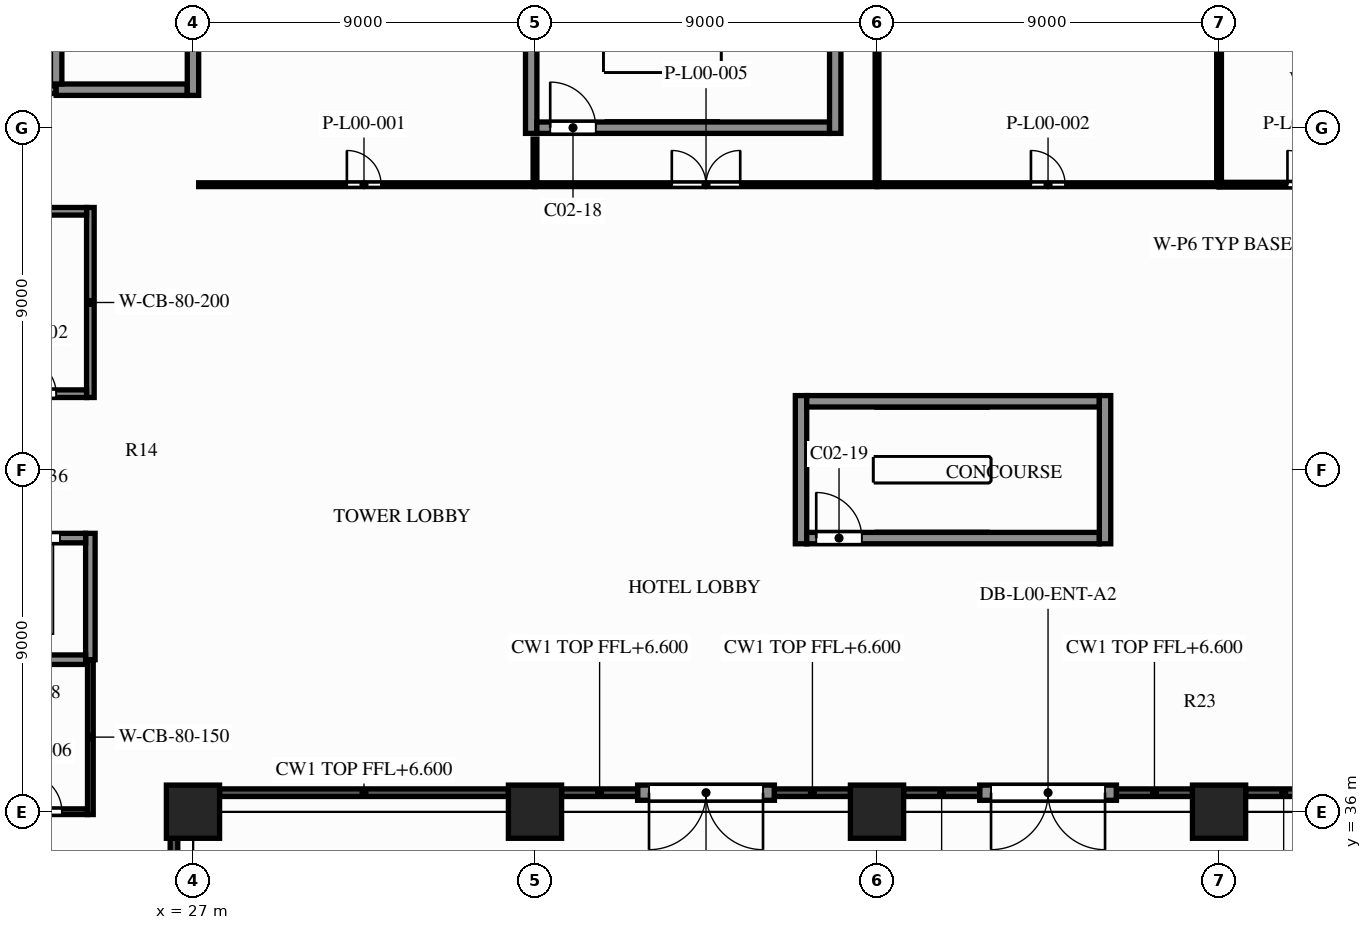
"""IFC4 building model, lengths in metres.
Left out: names, types, materials, properties, quantities, classifications, styles, units other than length and angle.
Written with IfcOpenShell. Run it as: python <this file> out.ifc"""

import sys

from ifc_helpers import new_model, si_unit, direction, frame, frame_2d, origin, origin_2d, place, context, subcontext, project, spatial, rectangle, extrude, element, fill, save


model = new_model("IFC4")
c1 = context("Model", 3, precision=1e-05, world=origin(), true_north=direction((0.0, 1.0)))
c2 = subcontext(c1, "Body", "Model", "MODEL_VIEW")
j1 = project(units=[si_unit("LENGTHUNIT", "METRE"), si_unit("PLANEANGLEUNIT", "RADIAN")], contexts=[c1])
p1 = place(None, origin())
s1 = spatial("IfcSite", under=j1, at=p1, CompositionType="ELEMENT")
p2 = place(p1, origin())
s2 = spatial("IfcBuilding", under=s1, at=p2, CompositionType="ELEMENT")
p3 = place(p2, origin())
s3 = spatial("IfcBuildingStorey", under=s2, at=p3, CompositionType="ELEMENT", Elevation=0.0)
for number, where, z_axis, x_axis in (
    (1, (27.0, 36.0, 0.0), (0.0, 0.0, 1.0), (1.0, 0.0, 0.0)),
    (2, (36.0, 36.0, 0.0), (0.0, 0.0, 1.0), (1.0, 0.0, 0.0)),
    (3, (45.0, 36.0, 0.0), (0.0, 0.0, 1.0), (1.0, 0.0, 0.0)),
    (4, (54.0, 36.0, 0.0), (0.0, 0.0, 1.0), (1.0, 0.0, 0.0)),
):
    element("IfcColumn", number, at=place(p3, frame(where, z_axis=z_axis, x_axis=x_axis)), inside=s3, PredefinedType="COLUMN", context=c2, shape_type="SweptSolid", body=[
        extrude(rectangle(XDim=1.4, YDim=1.4, at=origin_2d()), origin(), (0.0, 0.0, 1.0), 7.5),
    ])
p4 = place(p3, frame((42.3, 36.5, 0.0), z_axis=(0.0, 0.0, 1.0), x_axis=(-1.0, 0.0, 0.0)))
e5 = element("IfcWall", 5, at=p4, inside=s3, PredefinedType="SOLIDWALL", context=c2, shape_type="SweptSolid", body=[
    extrude(rectangle(XDim=3.6, YDim=0.4, at=frame_2d((1.8, 0.0))), origin(), (0.0, 0.0, 1.0), 6.6),
])
p5 = place(p4, frame((0.3, 0.0, 0.0)))
e6 = element("IfcOpeningElement", 6, at=p5, cuts=e5, PredefinedType="OPENING", context=c2, shape_type="SweptSolid", body=[
    extrude(rectangle(XDim=3.0, YDim=3.0, at=frame_2d((1.5, 1.5))), frame((0.0, 0.21, 0.0), z_axis=(0.0, -1.0, 0.0), x_axis=(1.0, 0.0, 0.0)), (0.0, 0.0, 1.0), 0.42),
])
p6 = place(p3, frame((51.3, 36.5, 0.0), z_axis=(0.0, 0.0, 1.0), x_axis=(-1.0, 0.0, 0.0)))
e7 = element("IfcWall", 7, at=p6, inside=s3, PredefinedType="SOLIDWALL", context=c2, shape_type="SweptSolid", body=[
    extrude(rectangle(XDim=3.6, YDim=0.4, at=frame_2d((1.8, 0.0))), origin(), (0.0, 0.0, 1.0), 6.6),
])
p7 = place(p6, frame((0.3, 0.0, 0.0)))
e8 = element("IfcOpeningElement", 8, at=p7, cuts=e7, PredefinedType="OPENING", context=c2, shape_type="SweptSolid", body=[
    extrude(rectangle(XDim=3.0, YDim=3.0, at=frame_2d((1.5, 1.5))), frame((0.0, 0.21, 0.0), z_axis=(0.0, -1.0, 0.0), x_axis=(1.0, 0.0, 0.0)), (0.0, 0.0, 1.0), 0.42),
])
p8 = place(p3, frame((12.4, 36.0, 0.0), z_axis=(0.0, 0.0, 1.0), x_axis=(1.0, 0.0, 0.0)))
e9 = element("IfcWall", 9, at=p8, inside=s3, PredefinedType="SHEAR", context=c2, shape_type="SweptSolid", body=[
    extrude(rectangle(XDim=11.825, YDim=0.15, at=frame_2d((5.913, 0.0))), origin(), (0.0, 0.0, 1.0), 7.2),
])
p9 = place(p8, frame((0.725, 0.0, 0.0)))
e10 = element("IfcOpeningElement", 10, at=p9, cuts=e9, PredefinedType="OPENING", context=c2, shape_type="SweptSolid", body=[
    extrude(rectangle(XDim=0.95, YDim=2.1, at=frame_2d((0.475, 1.05))), frame((0.0, 0.085, 0.0), z_axis=(0.0, -1.0, 0.0), x_axis=(1.0, 0.0, 0.0)), (0.0, 0.0, 1.0), 0.17),
])
p10 = place(p8, frame((3.7, 0.0, 0.0)))
e11 = element("IfcOpeningElement", 11, at=p10, cuts=e9, PredefinedType="OPENING", context=c2, shape_type="SweptSolid", body=[
    extrude(rectangle(XDim=0.9, YDim=2.1, at=frame_2d((0.45, 1.05))), frame((0.0, 0.085, 0.0), z_axis=(0.0, -1.0, 0.0), x_axis=(1.0, 0.0, 0.0)), (0.0, 0.0, 1.0), 0.17),
])
p11 = place(p8, frame((7.2, 0.0, 0.0)))
e12 = element("IfcOpeningElement", 12, at=p11, cuts=e9, PredefinedType="OPENING", context=c2, shape_type="SweptSolid", body=[
    extrude(rectangle(XDim=0.9, YDim=2.1, at=frame_2d((0.45, 1.05))), frame((0.0, 0.085, 0.0), z_axis=(0.0, -1.0, 0.0), x_axis=(1.0, 0.0, 0.0)), (0.0, 0.0, 1.0), 0.17),
])
p12 = place(p8, frame((10.15, 0.0, 0.0)))
e13 = element("IfcOpeningElement", 13, at=p12, cuts=e9, PredefinedType="OPENING", context=c2, shape_type="SweptSolid", body=[
    extrude(rectangle(XDim=1.0, YDim=2.1, at=frame_2d((0.5, 1.05))), frame((0.0, 0.085, 0.0), z_axis=(0.0, -1.0, 0.0), x_axis=(1.0, 0.0, 0.0)), (0.0, 0.0, 1.0), 0.17),
])
p13 = place(p3, frame((8.1, 40.0, 0.0), z_axis=(0.0, 0.0, 1.0), x_axis=(1.0, 0.0, 0.0)))
e14 = element("IfcWall", 14, at=p13, inside=s3, PredefinedType="SHEAR", context=c2, shape_type="SweptSolid", body=[
    extrude(rectangle(XDim=16.075, YDim=0.25, at=frame_2d((8.038, 0.0))), origin(), (0.0, 0.0, 1.0), 7.2),
])
p14 = place(p3, frame((8.1, 43.2, 0.0), z_axis=(0.0, 0.0, 1.0), x_axis=(1.0, 0.0, 0.0)))
e15 = element("IfcWall", 15, at=p14, inside=s3, PredefinedType="SHEAR", context=c2, shape_type="SweptSolid", body=[
    extrude(rectangle(XDim=16.075, YDim=0.25, at=frame_2d((8.038, 0.0))), origin(), (0.0, 0.0, 1.0), 7.2),
])
p15 = place(p14, frame((14.3, 0.0, 0.0)))
e16 = element("IfcOpeningElement", 16, at=p15, cuts=e15, PredefinedType="OPENING", context=c2, shape_type="SweptSolid", body=[
    extrude(rectangle(XDim=1.1, YDim=2.1, at=frame_2d((0.55, 1.05))), frame((0.0, 0.135, 0.0), z_axis=(0.0, -1.0, 0.0), x_axis=(1.0, 0.0, 0.0)), (0.0, 0.0, 1.0), 0.27),
])
p16 = place(p14, frame((0.8, 0.0, 0.0)))
e17 = element("IfcOpeningElement", 17, at=p16, cuts=e15, PredefinedType="OPENING", context=c2, shape_type="SweptSolid", body=[
    extrude(rectangle(XDim=1.1, YDim=2.1, at=frame_2d((0.55, 1.05))), frame((0.0, 0.135, 0.0), z_axis=(0.0, -1.0, 0.0), x_axis=(1.0, 0.0, 0.0)), (0.0, 0.0, 1.0), 0.27),
])
p17 = place(p14, frame((3.5, 0.0, 0.0)))
e18 = element("IfcOpeningElement", 18, at=p17, cuts=e15, PredefinedType="OPENING", context=c2, shape_type="SweptSolid", body=[
    extrude(rectangle(XDim=1.1, YDim=2.1, at=frame_2d((0.55, 1.05))), frame((0.0, 0.135, 0.0), z_axis=(0.0, -1.0, 0.0), x_axis=(1.0, 0.0, 0.0)), (0.0, 0.0, 1.0), 0.27),
])
p18 = place(p14, frame((6.2, 0.0, 0.0)))
e19 = element("IfcOpeningElement", 19, at=p18, cuts=e15, PredefinedType="OPENING", context=c2, shape_type="SweptSolid", body=[
    extrude(rectangle(XDim=1.1, YDim=2.1, at=frame_2d((0.55, 1.05))), frame((0.0, 0.135, 0.0), z_axis=(0.0, -1.0, 0.0), x_axis=(1.0, 0.0, 0.0)), (0.0, 0.0, 1.0), 0.27),
])
p19 = place(p14, frame((8.9, 0.0, 0.0)))
e20 = element("IfcOpeningElement", 20, at=p19, cuts=e15, PredefinedType="OPENING", context=c2, shape_type="SweptSolid", body=[
    extrude(rectangle(XDim=1.1, YDim=2.1, at=frame_2d((0.55, 1.05))), frame((0.0, 0.135, 0.0), z_axis=(0.0, -1.0, 0.0), x_axis=(1.0, 0.0, 0.0)), (0.0, 0.0, 1.0), 0.27),
])
p20 = place(p14, frame((11.6, 0.0, 0.0)))
e21 = element("IfcOpeningElement", 21, at=p20, cuts=e15, PredefinedType="OPENING", context=c2, shape_type="SweptSolid", body=[
    extrude(rectangle(XDim=1.1, YDim=2.1, at=frame_2d((0.55, 1.05))), frame((0.0, 0.135, 0.0), z_axis=(0.0, -1.0, 0.0), x_axis=(1.0, 0.0, 0.0)), (0.0, 0.0, 1.0), 0.27),
])
p21 = place(p3, frame((43.15, 43.2, 0.0), z_axis=(0.0, 0.0, 1.0), x_axis=(1.0, 0.0, 0.0)))
e22 = element("IfcWall", 22, at=p21, inside=s3, PredefinedType="SHEAR", context=c2, shape_type="SweptSolid", body=[
    extrude(rectangle(XDim=7.7, YDim=0.3, at=frame_2d((3.85, 0.0))), origin(), (0.0, 0.0, 1.0), 7.2),
])
p22 = place(p21, frame((0.25, 0.0, 0.0)))
e23 = element("IfcOpeningElement", 23, at=p22, cuts=e22, PredefinedType="OPENING", context=c2, shape_type="SweptSolid", body=[
    extrude(rectangle(XDim=1.2, YDim=2.2, at=frame_2d((0.6, 1.1))), frame((0.0, 0.16, 0.0), z_axis=(0.0, -1.0, 0.0), x_axis=(1.0, 0.0, 0.0)), (0.0, 0.0, 1.0), 0.32),
])
p23 = place(p3, frame((43.15, 46.8, 0.0), z_axis=(0.0, 0.0, 1.0), x_axis=(1.0, 0.0, 0.0)))
e24 = element("IfcWall", 24, at=p23, inside=s3, PredefinedType="SHEAR", context=c2, shape_type="SweptSolid", body=[
    extrude(rectangle(XDim=7.7, YDim=0.3, at=frame_2d((3.85, 0.0))), origin(), (0.0, 0.0, 1.0), 7.2),
])
p24 = place(p3, frame((21.6, 47.0, 0.0), z_axis=(0.0, 0.0, 1.0), x_axis=(1.0, 0.0, 0.0)))
e25 = element("IfcWall", 25, at=p24, inside=s3, PredefinedType="PARTITIONING", context=c2, shape_type="SweptSolid", body=[
    extrude(rectangle(XDim=2.6, YDim=0.2, at=frame_2d((1.3, 0.0))), origin(), (0.0, 0.0, 1.0), 7.2),
])
p25 = place(p24, frame((0.9, 0.0, 0.0)))
e26 = element("IfcOpeningElement", 26, at=p25, cuts=e25, PredefinedType="OPENING", context=c2, shape_type="SweptSolid", body=[
    extrude(rectangle(XDim=0.9, YDim=2.1, at=frame_2d((0.45, 1.05))), frame((0.0, 0.11, 0.0), z_axis=(0.0, -1.0, 0.0), x_axis=(1.0, 0.0, 0.0)), (0.0, 0.0, 1.0), 0.22),
])
p26 = place(p3, frame((21.6, 51.8, 0.0), z_axis=(0.0, 0.0, 1.0), x_axis=(1.0, 0.0, 0.0)))
e27 = element("IfcWall", 27, at=p26, inside=s3, PredefinedType="PARTITIONING", context=c2, shape_type="SweptSolid", body=[
    extrude(rectangle(XDim=2.6, YDim=0.2, at=frame_2d((1.3, 0.0))), origin(), (0.0, 0.0, 1.0), 7.2),
])
p27 = place(p3, frame((36.05, 54.0, 0.0), z_axis=(0.0, 0.0, 1.0), x_axis=(1.0, 0.0, 0.0)))
e28 = element("IfcWall", 28, at=p27, inside=s3, PredefinedType="SHEAR", context=c2, shape_type="SweptSolid", body=[
    extrude(rectangle(XDim=7.7, YDim=0.3, at=frame_2d((3.85, 0.0))), origin(), (0.0, 0.0, 1.0), 7.2),
])
p28 = place(p27, frame((0.35, 0.0, 0.0)))
e29 = element("IfcOpeningElement", 29, at=p28, cuts=e28, PredefinedType="OPENING", context=c2, shape_type="SweptSolid", body=[
    extrude(rectangle(XDim=1.2, YDim=2.2, at=frame_2d((0.6, 1.1))), frame((0.0, 0.16, 0.0), z_axis=(0.0, -1.0, 0.0), x_axis=(1.0, 0.0, 0.0)), (0.0, 0.0, 1.0), 0.32),
])
p29 = place(p3, frame((16.85, 55.0, 0.0), z_axis=(0.0, 0.0, 1.0), x_axis=(1.0, 0.0, 0.0)))
e30 = element("IfcWall", 30, at=p29, inside=s3, PredefinedType="PARTITIONING", context=c2, shape_type="SweptSolid", body=[
    extrude(rectangle(XDim=6.55, YDim=0.2, at=frame_2d((3.275, 0.0))), origin(), (0.0, 0.0, 1.0), 7.2),
])
p30 = place(p29, frame((2.775, 0.0, 0.0)))
e31 = element("IfcOpeningElement", 31, at=p30, cuts=e30, PredefinedType="OPENING", context=c2, shape_type="SweptSolid", body=[
    extrude(rectangle(XDim=1.0, YDim=2.1, at=frame_2d((0.5, 1.05))), frame((0.0, 0.11, 0.0), z_axis=(0.0, -1.0, 0.0), x_axis=(1.0, 0.0, 0.0)), (0.0, 0.0, 1.0), 0.22),
])
p31 = place(p3, frame((23.4, 55.0, 0.0), z_axis=(0.0, 0.0, 1.0), x_axis=(1.0, 0.0, 0.0)))
e32 = element("IfcWall", 32, at=p31, inside=s3, PredefinedType="SHEAR", context=c2, shape_type="SweptSolid", body=[
    extrude(rectangle(XDim=3.45, YDim=0.3, at=frame_2d((1.725, 0.0))), origin(), (0.0, 0.0, 1.0), 7.2),
])
p32 = place(p3, frame((23.4, 55.15, 0.0), z_axis=(0.0, 0.0, 1.0), x_axis=(0.0, 1.0, 0.0)))
e33 = element("IfcWall", 33, at=p32, inside=s3, PredefinedType="SHEAR", context=c2, shape_type="SweptSolid", body=[
    extrude(rectangle(XDim=8.0, YDim=0.3, at=frame_2d((4.0, 0.0))), origin(), (0.0, 0.0, 1.0), 7.2),
])
p33 = place(p3, frame((24.3, 35.925, 0.0), z_axis=(0.0, 0.0, 1.0), x_axis=(0.0, 1.0, 0.0)))
e34 = element("IfcWall", 34, at=p33, inside=s3, PredefinedType="SHEAR", context=c2, shape_type="SweptSolid", body=[
    extrude(rectangle(XDim=4.075, YDim=0.15, at=frame_2d((2.038, 0.0))), origin(), (0.0, 0.0, 1.0), 7.2),
])
p34 = place(p3, frame((24.3, 46.9, 0.0), z_axis=(0.0, 0.0, 1.0), x_axis=(0.0, 1.0, 0.0)))
e35 = element("IfcWall", 35, at=p34, inside=s3, PredefinedType="SHEAR", context=c2, shape_type="SweptSolid", body=[
    extrude(rectangle(XDim=5.0, YDim=0.2, at=frame_2d((2.5, 0.0))), origin(), (0.0, 0.0, 1.0), 7.2),
])
p35 = place(p3, frame((24.3, 40.0, 0.0), z_axis=(0.0, 0.0, 1.0), x_axis=(0.0, 1.0, 0.0)))
e36 = element("IfcWall", 36, at=p35, inside=s3, PredefinedType="SHEAR", context=c2, shape_type="SweptSolid", body=[
    extrude(rectangle(XDim=3.325, YDim=0.25, at=frame_2d((1.663, 0.0))), origin(), (0.0, 0.0, 1.0), 7.2),
])
p36 = place(p3, frame((27.0, 54.85, 0.0), z_axis=(0.0, 0.0, 1.0), x_axis=(0.0, 1.0, 0.0)))
e37 = element("IfcWall", 37, at=p36, inside=s3, PredefinedType="SHEAR", context=c2, shape_type="SweptSolid", body=[
    extrude(rectangle(XDim=8.35, YDim=0.3, at=frame_2d((4.175, 0.0))), origin(), (0.0, 0.0, 1.0), 7.2),
])
p37 = place(p36, frame((6.55, 0.0, 0.0)))
e38 = element("IfcOpeningElement", 38, at=p37, cuts=e37, PredefinedType="OPENING", context=c2, shape_type="SweptSolid", body=[
    extrude(rectangle(XDim=1.2, YDim=2.2, at=frame_2d((0.6, 1.1))), frame((0.0, 0.16, 0.0), z_axis=(0.0, -1.0, 0.0), x_axis=(1.0, 0.0, 0.0)), (0.0, 0.0, 1.0), 0.32),
])
for number, where, z_axis, x_axis in (
    (39, (35.9, 53.85, 0.0), (0.0, 0.0, 1.0), (0.0, 1.0, 0.0)),
    (40, (43.0, 43.05, 0.0), (0.0, 0.0, 1.0), (0.0, 1.0, 0.0)),
    (41, (43.9, 53.85, 0.0), (0.0, 0.0, 1.0), (0.0, 1.0, 0.0)),
    (42, (51.0, 43.05, 0.0), (0.0, 0.0, 1.0), (0.0, 1.0, 0.0)),
):
    element("IfcWall", number, at=place(p3, frame(where, z_axis=z_axis, x_axis=x_axis)), inside=s3, PredefinedType="SHEAR", context=c2, shape_type="SweptSolid", body=[
        extrude(rectangle(XDim=3.9, YDim=0.3, at=frame_2d((1.95, 0.0))), origin(), (0.0, 0.0, 1.0), 7.2),
    ])
p38 = place(p3, frame((27.15, 52.5, 0.0), z_axis=(0.0, 0.0, 1.0), x_axis=(1.0, 0.0, 0.0)))
e43 = element("IfcWall", 43, at=p38, inside=s3, PredefinedType="PARTITIONING", context=c2, shape_type="SweptSolid", body=[
    extrude(rectangle(XDim=8.85, YDim=0.1, at=frame_2d((4.425, 0.0))), origin(), (0.0, 0.0, 1.0), 6.48),
])
p39 = place(p38, frame((3.9, 0.0, 0.0)))
e44 = element("IfcOpeningElement", 44, at=p39, cuts=e43, PredefinedType="OPENING", context=c2, shape_type="SweptSolid", body=[
    extrude(rectangle(XDim=0.9, YDim=2.1, at=frame_2d((0.45, 1.05))), frame((0.0, 0.06, 0.0), z_axis=(0.0, -1.0, 0.0), x_axis=(1.0, 0.0, 0.0)), (0.0, 0.0, 1.0), 0.12),
])
p40 = place(p3, frame((36.0, 52.5, 0.0), z_axis=(0.0, 0.0, 1.0), x_axis=(1.0, 0.0, 0.0)))
e45 = element("IfcWall", 45, at=p40, inside=s3, PredefinedType="PARTITIONING", context=c2, shape_type="SweptSolid", body=[
    extrude(rectangle(XDim=9.0, YDim=0.1, at=frame_2d((4.5, 0.0))), origin(), (0.0, 0.0, 1.0), 6.48),
])
p41 = place(p40, frame((3.6, 0.0, 0.0)))
e46 = element("IfcOpeningElement", 46, at=p41, cuts=e45, PredefinedType="OPENING", context=c2, shape_type="SweptSolid", body=[
    extrude(rectangle(XDim=1.8, YDim=2.1, at=frame_2d((0.9, 1.05))), frame((0.0, 0.06, 0.0), z_axis=(0.0, -1.0, 0.0), x_axis=(1.0, 0.0, 0.0)), (0.0, 0.0, 1.0), 0.12),
])
p42 = place(p3, frame((45.0, 52.5, 0.0), z_axis=(0.0, 0.0, 1.0), x_axis=(1.0, 0.0, 0.0)))
e47 = element("IfcWall", 47, at=p42, inside=s3, PredefinedType="PARTITIONING", context=c2, shape_type="SweptSolid", body=[
    extrude(rectangle(XDim=9.0, YDim=0.1, at=frame_2d((4.5, 0.0))), origin(), (0.0, 0.0, 1.0), 6.48),
])
p43 = place(p42, frame((4.05, 0.0, 0.0)))
e48 = element("IfcOpeningElement", 48, at=p43, cuts=e47, PredefinedType="OPENING", context=c2, shape_type="SweptSolid", body=[
    extrude(rectangle(XDim=0.9, YDim=2.1, at=frame_2d((0.45, 1.05))), frame((0.0, 0.06, 0.0), z_axis=(0.0, -1.0, 0.0), x_axis=(1.0, 0.0, 0.0)), (0.0, 0.0, 1.0), 0.12),
])
p44 = place(p3, frame((54.0, 52.5, 0.0), z_axis=(0.0, 0.0, 1.0), x_axis=(1.0, 0.0, 0.0)))
e49 = element("IfcWall", 49, at=p44, inside=s3, PredefinedType="PARTITIONING", context=c2, shape_type="SweptSolid", body=[
    extrude(rectangle(XDim=4.5, YDim=0.125, at=frame_2d((2.25, 0.0))), origin(), (0.0, 0.0, 1.0), 6.48),
])
p45 = place(p44, frame((1.8, 0.0, 0.0)))
e50 = element("IfcOpeningElement", 50, at=p45, cuts=e49, PredefinedType="OPENING", context=c2, shape_type="SweptSolid", body=[
    extrude(rectangle(XDim=0.9, YDim=2.1, at=frame_2d((0.45, 1.05))), frame((0.0, 0.073, 0.0), z_axis=(0.0, -1.0, 0.0), x_axis=(1.0, 0.0, 0.0)), (0.0, 0.0, 1.0), 0.145),
])
p46 = place(p3, frame((36.0, 53.7, 0.0), z_axis=(0.0, 0.0, 1.0), x_axis=(0.0, -1.0, 0.0)))
e51 = element("IfcWall", 51, at=p46, inside=s3, PredefinedType="PARTITIONING", context=c2, shape_type="SweptSolid", body=[
    extrude(rectangle(XDim=1.15, YDim=0.1, at=frame_2d((0.575, 0.0))), origin(), (0.0, 0.0, 1.0), 6.48),
])
p47 = place(p3, frame((54.0, 57.9, 0.0), z_axis=(0.0, 0.0, 1.0), x_axis=(0.0, -1.0, 0.0)))
e52 = element("IfcWall", 52, at=p47, inside=s3, PredefinedType="PARTITIONING", context=c2, shape_type="SweptSolid", body=[
    extrude(rectangle(XDim=5.337, YDim=0.125, at=frame_2d((2.669, 0.0))), origin(), (0.0, 0.0, 1.0), 6.48),
])
p48 = place(p3, frame((45.0, 63.18, 0.0), z_axis=(0.0, 0.0, 1.0), x_axis=(0.0, -1.0, 0.0)))
e53 = element("IfcWall", 53, at=p48, inside=s3, PredefinedType="PARTITIONING", context=c2, shape_type="SweptSolid", body=[
    extrude(rectangle(XDim=10.63, YDim=0.1, at=frame_2d((5.315, 0.0))), origin(), (0.0, 0.0, 1.0), 6.48),
])
p49 = place(p5, origin())
e54 = element("IfcDoor", 54, at=p49, inside=s3, OperationType="DOUBLE_DOOR_SINGLE_SWING", PredefinedType="DOOR", context=c2, shape_type="SweptSolid", body=[
    extrude(rectangle(XDim=3.0, YDim=3.0, at=frame_2d((1.5, 1.5))), frame((0.0, 0.025, 0.0), z_axis=(0.0, -1.0, 0.0), x_axis=(1.0, 0.0, 0.0)), (0.0, 0.0, 1.0), 0.05),
])
fill(e6, e54)
p50 = place(p7, origin())
e55 = element("IfcDoor", 55, at=p50, inside=s3, OperationType="DOUBLE_DOOR_SINGLE_SWING", PredefinedType="DOOR", context=c2, shape_type="SweptSolid", body=[
    extrude(rectangle(XDim=3.0, YDim=3.0, at=frame_2d((1.5, 1.5))), frame((0.0, 0.025, 0.0), z_axis=(0.0, -1.0, 0.0), x_axis=(1.0, 0.0, 0.0)), (0.0, 0.0, 1.0), 0.05),
])
fill(e8, e55)
p51 = place(p25, origin())
e56 = element("IfcDoor", 56, at=p51, inside=s3, OperationType="SINGLE_SWING_LEFT", PredefinedType="DOOR", context=c2, shape_type="SweptSolid", body=[
    extrude(rectangle(XDim=0.9, YDim=2.1, at=frame_2d((0.45, 1.05))), frame((0.0, 0.025, 0.0), z_axis=(0.0, -1.0, 0.0), x_axis=(1.0, 0.0, 0.0)), (0.0, 0.0, 1.0), 0.05),
])
fill(e26, e56)
p52 = place(p12, origin())
e57 = element("IfcDoor", 57, at=p52, inside=s3, OperationType="SINGLE_SWING_LEFT", PredefinedType="DOOR", context=c2, shape_type="SweptSolid", body=[
    extrude(rectangle(XDim=1.0, YDim=2.1, at=frame_2d((0.5, 1.05))), frame((0.0, 0.025, 0.0), z_axis=(0.0, -1.0, 0.0), x_axis=(1.0, 0.0, 0.0)), (0.0, 0.0, 1.0), 0.05),
])
fill(e13, e57)
p53 = place(p28, origin())
e58 = element("IfcDoor", 58, at=p53, inside=s3, OperationType="SINGLE_SWING_LEFT", PredefinedType="DOOR", context=c2, shape_type="SweptSolid", body=[
    extrude(rectangle(XDim=1.2, YDim=2.2, at=frame_2d((0.6, 1.1))), frame((0.0, 0.025, 0.0), z_axis=(0.0, -1.0, 0.0), x_axis=(1.0, 0.0, 0.0)), (0.0, 0.0, 1.0), 0.05),
])
fill(e29, e58)
p54 = place(p22, origin())
e59 = element("IfcDoor", 59, at=p54, inside=s3, OperationType="SINGLE_SWING_RIGHT", PredefinedType="DOOR", context=c2, shape_type="SweptSolid", body=[
    extrude(rectangle(XDim=1.2, YDim=2.2, at=frame_2d((0.6, 1.1))), frame((0.0, 0.025, 0.0), z_axis=(0.0, -1.0, 0.0), x_axis=(1.0, 0.0, 0.0)), (0.0, 0.0, 1.0), 0.05),
])
fill(e23, e59)
p55 = place(p15, origin())
e60 = element("IfcDoor", 60, at=p55, inside=s3, OperationType="DOUBLE_DOOR_SLIDING", PredefinedType="DOOR", context=c2, shape_type="SweptSolid", body=[
    extrude(rectangle(XDim=1.1, YDim=2.1, at=frame_2d((0.55, 1.05))), frame((0.0, 0.025, 0.0), z_axis=(0.0, -1.0, 0.0), x_axis=(1.0, 0.0, 0.0)), (0.0, 0.0, 1.0), 0.05),
])
fill(e16, e60)
p56 = place(p39, origin())
e61 = element("IfcDoor", 61, at=p56, inside=s3, OperationType="SINGLE_SWING_RIGHT", PredefinedType="DOOR", context=c2, shape_type="SweptSolid", body=[
    extrude(rectangle(XDim=0.9, YDim=2.1, at=frame_2d((0.45, 1.05))), frame((0.0, 0.025, 0.0), z_axis=(0.0, -1.0, 0.0), x_axis=(1.0, 0.0, 0.0)), (0.0, 0.0, 1.0), 0.05),
])
fill(e44, e61)
p57 = place(p43, origin())
e62 = element("IfcDoor", 62, at=p57, inside=s3, OperationType="SINGLE_SWING_RIGHT", PredefinedType="DOOR", context=c2, shape_type="SweptSolid", body=[
    extrude(rectangle(XDim=0.9, YDim=2.1, at=frame_2d((0.45, 1.05))), frame((0.0, 0.025, 0.0), z_axis=(0.0, -1.0, 0.0), x_axis=(1.0, 0.0, 0.0)), (0.0, 0.0, 1.0), 0.05),
])
fill(e48, e62)
p58 = place(p45, origin())
e63 = element("IfcDoor", 63, at=p58, inside=s3, OperationType="SINGLE_SWING_LEFT", PredefinedType="DOOR", context=c2, shape_type="SweptSolid", body=[
    extrude(rectangle(XDim=0.9, YDim=2.1, at=frame_2d((0.45, 1.05))), frame((0.0, 0.025, 0.0), z_axis=(0.0, -1.0, 0.0), x_axis=(1.0, 0.0, 0.0)), (0.0, 0.0, 1.0), 0.05),
])
fill(e50, e63)
p59 = place(p41, origin())
e64 = element("IfcDoor", 64, at=p59, inside=s3, OperationType="DOUBLE_DOOR_SINGLE_SWING", PredefinedType="DOOR", context=c2, shape_type="SweptSolid", body=[
    extrude(rectangle(XDim=1.8, YDim=2.1, at=frame_2d((0.9, 1.05))), frame((0.0, 0.025, 0.0), z_axis=(0.0, -1.0, 0.0), x_axis=(1.0, 0.0, 0.0)), (0.0, 0.0, 1.0), 0.05),
])
fill(e46, e64)
save(model, sys.argv[1])
